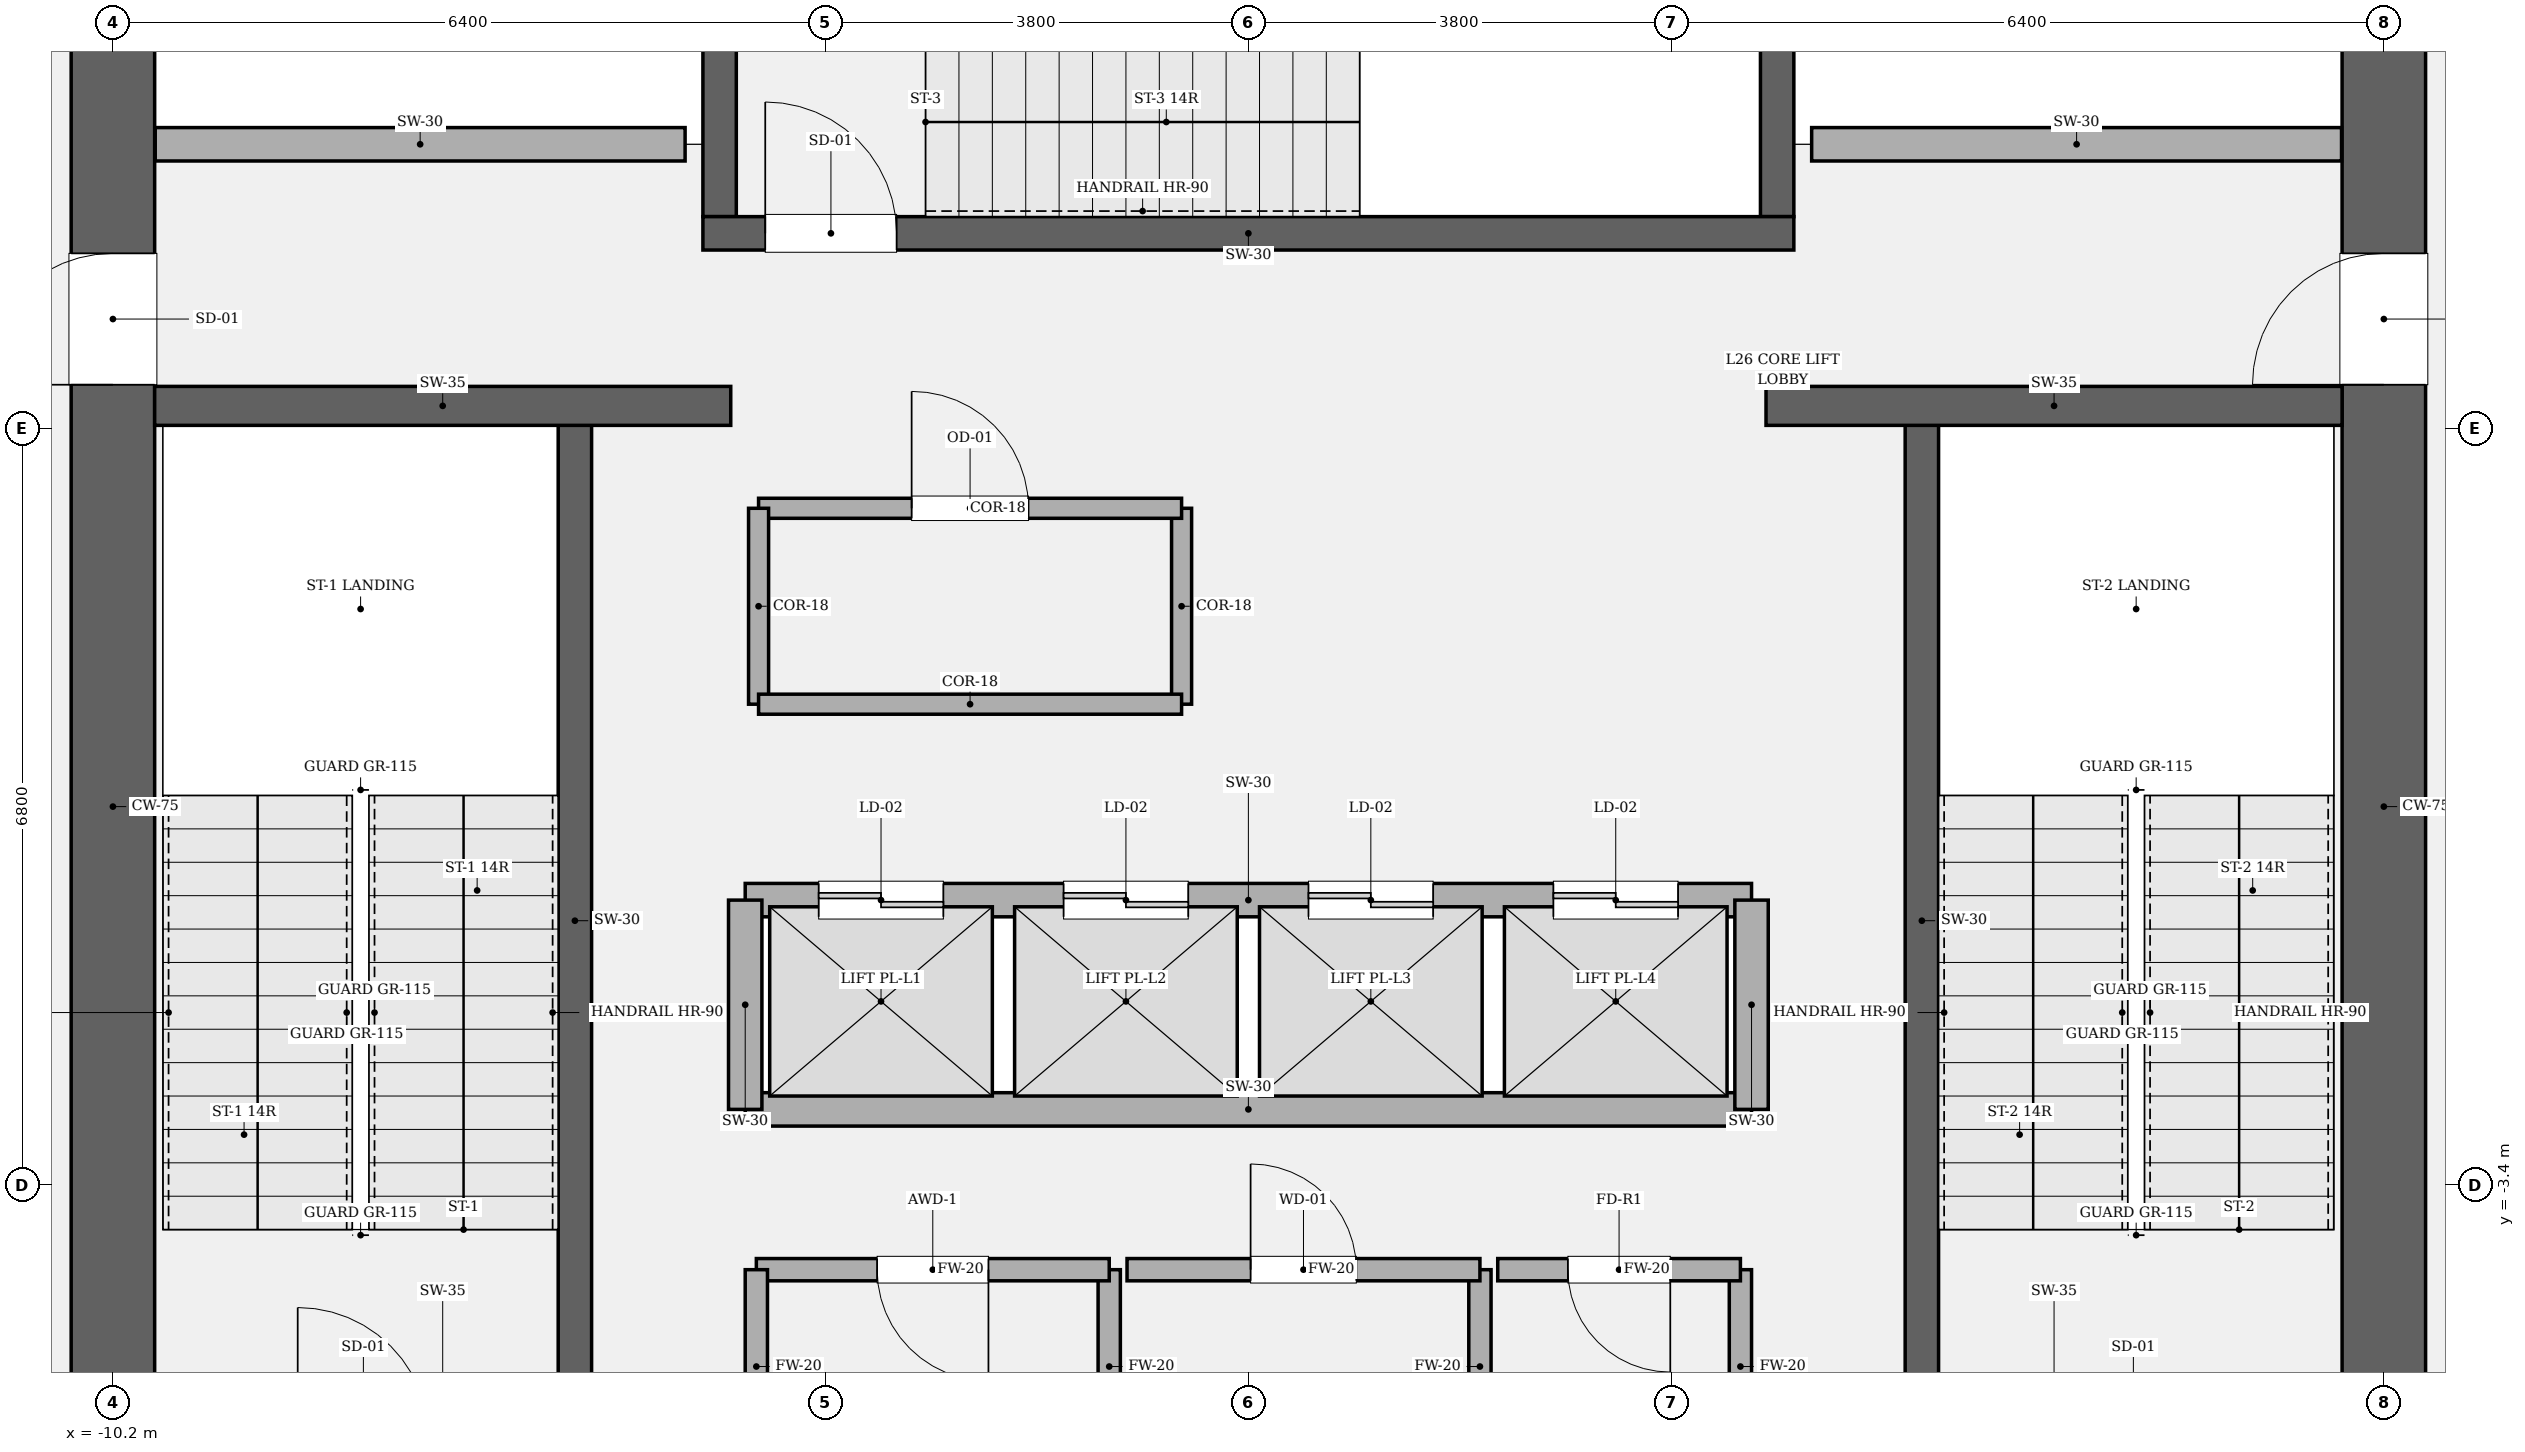
"""IFC4 building model, lengths in metres.
Left out: names, types, materials, properties, quantities, classifications, styles, units other than length and angle.
Written with IfcOpenShell. Run it as: python <this file> out.ifc"""

import sys

from ifc_helpers import new_model, si_unit, direction, frame, frame_2d, origin, place, context, subcontext, project, spatial, rectangle, extrude, element, fill, save


model = new_model("IFC4")
c1 = context("Model", 3, precision=1e-05, world=origin(), true_north=direction((0.0, 1.0)))
c2 = subcontext(c1, "Body", "Model", "MODEL_VIEW")
j1 = project(units=[si_unit("LENGTHUNIT", "METRE"), si_unit("PLANEANGLEUNIT", "RADIAN")], contexts=[c1])
p1 = place(None, origin())
s1 = spatial("IfcSite", under=j1, at=p1, CompositionType="ELEMENT")
p2 = place(p1, origin())
s2 = spatial("IfcBuilding", under=s1, at=p2, CompositionType="ELEMENT")
p3 = place(p2, frame((0.0, 0.0, 113.25)))
s3 = spatial("IfcBuildingStorey", under=s2, at=p3, CompositionType="ELEMENT", Elevation=113.25)
p4 = place(p3, frame((-10.2, -8.825, 0.0), z_axis=(0.0, 0.0, 1.0), x_axis=(0.0, 1.0, 0.0)))
e1 = element("IfcWall", 1, at=p4, inside=s3, PredefinedType="SHEAR", context=c2, shape_type="SweptSolid", body=[
    extrude(rectangle(XDim=17.65, YDim=0.75, at=frame_2d((8.825, 0.0))), origin(), (0.0, 0.0, 1.0), 4.05),
])
p5 = place(p4, frame((12.615, 0.0, 0.0)))
e2 = element("IfcOpeningElement", 2, at=p5, cuts=e1, PredefinedType="OPENING", context=c2, shape_type="SweptSolid", body=[
    extrude(rectangle(XDim=1.18, YDim=2.2, at=frame_2d((0.59, 1.1))), frame((0.0, 0.385, 0.0), z_axis=(0.0, -1.0, 0.0), x_axis=(1.0, 0.0, 0.0)), (0.0, 0.0, 1.0), 0.77),
])
p6 = place(p3, frame((10.2, 8.825, 0.0), z_axis=(0.0, 0.0, 1.0), x_axis=(0.0, -1.0, 0.0)))
e3 = element("IfcWall", 3, at=p6, inside=s3, PredefinedType="SHEAR", context=c2, shape_type="SweptSolid", body=[
    extrude(rectangle(XDim=17.65, YDim=0.75, at=frame_2d((8.825, 0.0))), origin(), (0.0, 0.0, 1.0), 4.05),
])
p7 = place(p6, frame((3.855, 0.0, 0.0)))
e4 = element("IfcOpeningElement", 4, at=p7, cuts=e3, PredefinedType="OPENING", context=c2, shape_type="SweptSolid", body=[
    extrude(rectangle(XDim=1.18, YDim=2.2, at=frame_2d((0.59, 1.1))), frame((0.0, 0.385, 0.0), z_axis=(0.0, -1.0, 0.0), x_axis=(1.0, 0.0, 0.0)), (0.0, 0.0, 1.0), 0.77),
])
for number, where, z_axis, x_axis in (
    (5, (-6.05, -5.5, 0.0), (0.0, 0.0, 1.0), (0.0, 1.0, 0.0)),
    (6, (6.05, 3.45, 0.0), (0.0, 0.0, 1.0), (0.0, -1.0, 0.0)),
):
    element("IfcWall", number, at=place(p3, frame(where, z_axis=z_axis, x_axis=x_axis)), inside=s3, PredefinedType="SOLIDWALL", context=c2, shape_type="SweptSolid", body=[
        extrude(rectangle(XDim=8.95, YDim=0.3, at=frame_2d((4.475, 0.0))), origin(), (0.0, 0.0, 1.0), 4.05),
    ])
for number, where, z_axis, x_axis in (
    (7, (-4.75, 5.3, 0.0), (0.0, 0.0, 1.0), (0.0, 1.0, 0.0)),
    (8, (4.75, 8.825, 0.0), (0.0, 0.0, 1.0), (0.0, -1.0, 0.0)),
):
    element("IfcWall", number, at=place(p3, frame(where, z_axis=z_axis, x_axis=x_axis)), inside=s3, PredefinedType="SOLIDWALL", context=c2, shape_type="SweptSolid", body=[
        extrude(rectangle(XDim=3.525, YDim=0.3, at=frame_2d((1.762, 0.0))), origin(), (0.0, 0.0, 1.0), 4.05),
    ])
p8 = place(p3, frame((-4.9, 5.15, 0.0), z_axis=(0.0, 0.0, 1.0), x_axis=(1.0, 0.0, 0.0)))
e9 = element("IfcWall", 9, at=p8, inside=s3, PredefinedType="SOLIDWALL", context=c2, shape_type="SweptSolid", body=[
    extrude(rectangle(XDim=9.8, YDim=0.3, at=frame_2d((4.9, 0.0))), origin(), (0.0, 0.0, 1.0), 4.05),
])
p9 = place(p8, frame((0.56, 0.0, 0.0)))
e10 = element("IfcOpeningElement", 10, at=p9, cuts=e9, PredefinedType="OPENING", context=c2, shape_type="SweptSolid", body=[
    extrude(rectangle(XDim=1.18, YDim=2.2, at=frame_2d((0.59, 1.1))), frame((0.0, 0.16, 0.0), z_axis=(0.0, -1.0, 0.0), x_axis=(1.0, 0.0, 0.0)), (0.0, 0.0, 1.0), 0.32),
])
for number, where, z_axis, x_axis in (
    (11, (-9.825, 3.6, 0.0), (0.0, 0.0, 1.0), (1.0, 0.0, 0.0)),
    (12, (4.65, 3.6, 0.0), (0.0, 0.0, 1.0), (1.0, 0.0, 0.0)),
):
    element("IfcWall", number, at=place(p3, frame(where, z_axis=z_axis, x_axis=x_axis)), inside=s3, PredefinedType="SOLIDWALL", context=c2, shape_type="SweptSolid", body=[
        extrude(rectangle(XDim=5.175, YDim=0.35, at=frame_2d((2.587, 0.0))), origin(), (0.0, 0.0, 1.0), 4.05),
    ])
p10 = place(p3, frame((-4.52, -0.84, 0.0), z_axis=(0.0, 0.0, 1.0), x_axis=(1.0, 0.0, 0.0)))
e13 = element("IfcWall", 13, at=p10, inside=s3, PredefinedType="SOLIDWALL", context=c2, shape_type="SweptSolid", body=[
    extrude(rectangle(XDim=9.04, YDim=0.3, at=frame_2d((4.52, 0.0))), origin(), (0.0, 0.0, 1.0), 3.81),
])
p11 = place(p10, frame((0.66, 0.0, 0.0)))
e14 = element("IfcOpeningElement", 14, at=p11, cuts=e13, PredefinedType="OPENING", context=c2, shape_type="SweptSolid", body=[
    extrude(rectangle(XDim=1.12, YDim=2.25, at=frame_2d((0.56, 1.125))), frame((0.0, 0.16, 0.0), z_axis=(0.0, -1.0, 0.0), x_axis=(1.0, 0.0, 0.0)), (0.0, 0.0, 1.0), 0.32),
])
p12 = place(p10, frame((2.86, 0.0, 0.0)))
e15 = element("IfcOpeningElement", 15, at=p12, cuts=e13, PredefinedType="OPENING", context=c2, shape_type="SweptSolid", body=[
    extrude(rectangle(XDim=1.12, YDim=2.25, at=frame_2d((0.56, 1.125))), frame((0.0, 0.16, 0.0), z_axis=(0.0, -1.0, 0.0), x_axis=(1.0, 0.0, 0.0)), (0.0, 0.0, 1.0), 0.32),
])
p13 = place(p10, frame((5.06, 0.0, 0.0)))
e16 = element("IfcOpeningElement", 16, at=p13, cuts=e13, PredefinedType="OPENING", context=c2, shape_type="SweptSolid", body=[
    extrude(rectangle(XDim=1.12, YDim=2.25, at=frame_2d((0.56, 1.125))), frame((0.0, 0.16, 0.0), z_axis=(0.0, -1.0, 0.0), x_axis=(1.0, 0.0, 0.0)), (0.0, 0.0, 1.0), 0.32),
])
p14 = place(p10, frame((7.26, 0.0, 0.0)))
e17 = element("IfcOpeningElement", 17, at=p14, cuts=e13, PredefinedType="OPENING", context=c2, shape_type="SweptSolid", body=[
    extrude(rectangle(XDim=1.12, YDim=2.25, at=frame_2d((0.56, 1.125))), frame((0.0, 0.16, 0.0), z_axis=(0.0, -1.0, 0.0), x_axis=(1.0, 0.0, 0.0)), (0.0, 0.0, 1.0), 0.32),
])
p15 = place(p3, frame((-4.52, -2.72, 0.0), z_axis=(0.0, 0.0, 1.0), x_axis=(1.0, 0.0, 0.0)))
e18 = element("IfcWall", 18, at=p15, inside=s3, PredefinedType="SOLIDWALL", context=c2, shape_type="SweptSolid", body=[
    extrude(rectangle(XDim=9.04, YDim=0.3, at=frame_2d((4.52, 0.0))), origin(), (0.0, 0.0, 1.0), 3.81),
])
for number, where, z_axis, x_axis in (
    (19, (-4.52, -2.72, 0.0), (0.0, 0.0, 1.0), (0.0, 1.0, 0.0)),
    (20, (4.52, -2.72, 0.0), (0.0, 0.0, 1.0), (0.0, 1.0, 0.0)),
):
    element("IfcWall", number, at=place(p3, frame(where, z_axis=z_axis, x_axis=x_axis)), inside=s3, PredefinedType="SOLIDWALL", context=c2, shape_type="SweptSolid", body=[
        extrude(rectangle(XDim=1.88, YDim=0.3, at=frame_2d((0.94, 0.0))), origin(), (0.0, 0.0, 1.0), 3.81),
    ])
for number, where, z_axis, x_axis in (
    (21, (-9.82, 5.95, 0.0), (0.0, 0.0, 1.0), (1.0, 0.0, 0.0)),
    (22, (5.06, 5.95, 0.0), (0.0, 0.0, 1.0), (1.0, 0.0, 0.0)),
):
    element("IfcWall", number, at=place(p3, frame(where, z_axis=z_axis, x_axis=x_axis)), inside=s3, PredefinedType="SOLIDWALL", context=c2, shape_type="SweptSolid", body=[
        extrude(rectangle(XDim=4.76, YDim=0.3, at=frame_2d((2.38, 0.0))), origin(), (0.0, 0.0, 1.0), 3.81),
    ])
p16 = place(p3, frame((-1.25, -5.9, 0.0), z_axis=(0.0, 0.0, 1.0), x_axis=(0.0, 1.0, 0.0)))
e23 = element("IfcWall", 23, at=p16, inside=s3, PredefinedType="SOLIDWALL", context=c2, shape_type="SweptSolid", body=[
    extrude(rectangle(XDim=1.74, YDim=0.2, at=frame_2d((0.87, 0.0))), origin(), (0.0, 0.0, 1.0), 3.81),
])
p17 = place(p3, frame((-1.25, -4.16, 0.0), z_axis=(0.0, 0.0, 1.0), x_axis=(-1.0, 0.0, 0.0)))
e24 = element("IfcWall", 24, at=p17, inside=s3, PredefinedType="SOLIDWALL", context=c2, shape_type="SweptSolid", body=[
    extrude(rectangle(XDim=3.17, YDim=0.2, at=frame_2d((1.585, 0.0))), origin(), (0.0, 0.0, 1.0), 3.81),
])
p18 = place(p17, frame((1.085, 0.0, 0.0)))
e25 = element("IfcOpeningElement", 25, at=p18, cuts=e24, PredefinedType="OPENING", context=c2, shape_type="SweptSolid", body=[
    extrude(rectangle(XDim=1.0, YDim=2.15, at=frame_2d((0.5, 1.075))), frame((0.0, 0.11, 0.0), z_axis=(0.0, -1.0, 0.0), x_axis=(1.0, 0.0, 0.0)), (0.0, 0.0, 1.0), 0.22),
])
for number, where, z_axis, x_axis in (
    (26, (-4.42, -4.16, 0.0), (0.0, 0.0, 1.0), (0.0, -1.0, 0.0)),
    (27, (2.08, -5.9, 0.0), (0.0, 0.0, 1.0), (0.0, 1.0, 0.0)),
):
    element("IfcWall", number, at=place(p3, frame(where, z_axis=z_axis, x_axis=x_axis)), inside=s3, PredefinedType="SOLIDWALL", context=c2, shape_type="SweptSolid", body=[
        extrude(rectangle(XDim=1.74, YDim=0.2, at=frame_2d((0.87, 0.0))), origin(), (0.0, 0.0, 1.0), 3.81),
    ])
p19 = place(p3, frame((2.08, -4.16, 0.0), z_axis=(0.0, 0.0, 1.0), x_axis=(-1.0, 0.0, 0.0)))
e28 = element("IfcWall", 28, at=p19, inside=s3, PredefinedType="SOLIDWALL", context=c2, shape_type="SweptSolid", body=[
    extrude(rectangle(XDim=3.17, YDim=0.2, at=frame_2d((1.585, 0.0))), origin(), (0.0, 0.0, 1.0), 3.81),
])
p20 = place(p19, frame((1.11, 0.0, 0.0)))
e29 = element("IfcOpeningElement", 29, at=p20, cuts=e28, PredefinedType="OPENING", context=c2, shape_type="SweptSolid", body=[
    extrude(rectangle(XDim=0.95, YDim=2.15, at=frame_2d((0.475, 1.075))), frame((0.0, 0.11, 0.0), z_axis=(0.0, -1.0, 0.0), x_axis=(1.0, 0.0, 0.0)), (0.0, 0.0, 1.0), 0.22),
])
p21 = place(p3, frame((4.42, -5.9, 0.0), z_axis=(0.0, 0.0, 1.0), x_axis=(0.0, 1.0, 0.0)))
e30 = element("IfcWall", 30, at=p21, inside=s3, PredefinedType="SOLIDWALL", context=c2, shape_type="SweptSolid", body=[
    extrude(rectangle(XDim=1.74, YDim=0.2, at=frame_2d((0.87, 0.0))), origin(), (0.0, 0.0, 1.0), 3.81),
])
p22 = place(p3, frame((4.42, -4.16, 0.0), z_axis=(0.0, 0.0, 1.0), x_axis=(-1.0, 0.0, 0.0)))
e31 = element("IfcWall", 31, at=p22, inside=s3, PredefinedType="SOLIDWALL", context=c2, shape_type="SweptSolid", body=[
    extrude(rectangle(XDim=2.18, YDim=0.2, at=frame_2d((1.09, 0.0))), origin(), (0.0, 0.0, 1.0), 3.81),
])
p23 = place(p22, frame((0.63, 0.0, 0.0)))
e32 = element("IfcOpeningElement", 32, at=p23, cuts=e31, PredefinedType="OPENING", context=c2, shape_type="SweptSolid", body=[
    extrude(rectangle(XDim=0.92, YDim=2.1, at=frame_2d((0.46, 1.05))), frame((0.0, 0.11, 0.0), z_axis=(0.0, -1.0, 0.0), x_axis=(1.0, 0.0, 0.0)), (0.0, 0.0, 1.0), 0.22),
])
p24 = place(p3, frame((-0.6, 0.92, 0.0), z_axis=(0.0, 0.0, 1.0), x_axis=(0.0, 1.0, 0.0)))
e33 = element("IfcWall", 33, at=p24, inside=s3, PredefinedType="PARTITIONING", context=c2, shape_type="SweptSolid", body=[
    extrude(rectangle(XDim=1.76, YDim=0.18, at=frame_2d((0.88, 0.0))), origin(), (0.0, 0.0, 1.0), 3.81),
])
p25 = place(p3, frame((-0.6, 2.68, 0.0), z_axis=(0.0, 0.0, 1.0), x_axis=(-1.0, 0.0, 0.0)))
e34 = element("IfcWall", 34, at=p25, inside=s3, PredefinedType="PARTITIONING", context=c2, shape_type="SweptSolid", body=[
    extrude(rectangle(XDim=3.8, YDim=0.18, at=frame_2d((1.9, 0.0))), origin(), (0.0, 0.0, 1.0), 3.81),
])
p26 = place(p25, frame((1.375, 0.0, 0.0)))
e35 = element("IfcOpeningElement", 35, at=p26, cuts=e34, PredefinedType="OPENING", context=c2, shape_type="SweptSolid", body=[
    extrude(rectangle(XDim=1.05, YDim=2.2, at=frame_2d((0.525, 1.1))), frame((0.0, 0.1, 0.0), z_axis=(0.0, -1.0, 0.0), x_axis=(1.0, 0.0, 0.0)), (0.0, 0.0, 1.0), 0.2),
])
p27 = place(p3, frame((-4.4, 2.68, 0.0), z_axis=(0.0, 0.0, 1.0), x_axis=(0.0, -1.0, 0.0)))
e36 = element("IfcWall", 36, at=p27, inside=s3, PredefinedType="PARTITIONING", context=c2, shape_type="SweptSolid", body=[
    extrude(rectangle(XDim=1.76, YDim=0.18, at=frame_2d((0.88, 0.0))), origin(), (0.0, 0.0, 1.0), 3.81),
])
p28 = place(p3, frame((-4.4, 0.92, 0.0), z_axis=(0.0, 0.0, 1.0), x_axis=(1.0, 0.0, 0.0)))
e37 = element("IfcWall", 37, at=p28, inside=s3, PredefinedType="PARTITIONING", context=c2, shape_type="SweptSolid", body=[
    extrude(rectangle(XDim=3.8, YDim=0.18, at=frame_2d((1.9, 0.0))), origin(), (0.0, 0.0, 1.0), 3.81),
])
p29 = place(p9, origin())
e38 = element("IfcDoor", 38, at=p29, inside=s3, OperationType="SINGLE_SWING_LEFT", PredefinedType="DOOR", context=c2, shape_type="SweptSolid", body=[
    extrude(rectangle(XDim=1.18, YDim=2.2, at=frame_2d((0.59, 1.1))), frame((0.0, 0.025, 0.0), z_axis=(0.0, -1.0, 0.0), x_axis=(1.0, 0.0, 0.0)), (0.0, 0.0, 1.0), 0.05),
])
fill(e10, e38)
p30 = place(p5, origin())
e39 = element("IfcDoor", 39, at=p30, inside=s3, OperationType="SINGLE_SWING_LEFT", PredefinedType="DOOR", context=c2, shape_type="SweptSolid", body=[
    extrude(rectangle(XDim=1.18, YDim=2.2, at=frame_2d((0.59, 1.1))), frame((0.0, 0.025, 0.0), z_axis=(0.0, -1.0, 0.0), x_axis=(1.0, 0.0, 0.0)), (0.0, 0.0, 1.0), 0.05),
])
fill(e2, e39)
p31 = place(p7, origin())
e40 = element("IfcDoor", 40, at=p31, inside=s3, OperationType="SINGLE_SWING_RIGHT", PredefinedType="DOOR", context=c2, shape_type="SweptSolid", body=[
    extrude(rectangle(XDim=1.18, YDim=2.2, at=frame_2d((0.59, 1.1))), frame((0.0, 0.025, 0.0), z_axis=(0.0, -1.0, 0.0), x_axis=(1.0, 0.0, 0.0)), (0.0, 0.0, 1.0), 0.05),
])
fill(e4, e40)
p32 = place(p11, origin())
e41 = element("IfcDoor", 41, at=p32, inside=s3, OperationType="DOUBLE_DOOR_SLIDING", PredefinedType="DOOR", context=c2, shape_type="SweptSolid", body=[
    extrude(rectangle(XDim=1.12, YDim=2.25, at=frame_2d((0.56, 1.125))), frame((0.0, 0.025, 0.0), z_axis=(0.0, -1.0, 0.0), x_axis=(1.0, 0.0, 0.0)), (0.0, 0.0, 1.0), 0.05),
])
fill(e14, e41)
p33 = place(p12, origin())
e42 = element("IfcDoor", 42, at=p33, inside=s3, OperationType="DOUBLE_DOOR_SLIDING", PredefinedType="DOOR", context=c2, shape_type="SweptSolid", body=[
    extrude(rectangle(XDim=1.12, YDim=2.25, at=frame_2d((0.56, 1.125))), frame((0.0, 0.025, 0.0), z_axis=(0.0, -1.0, 0.0), x_axis=(1.0, 0.0, 0.0)), (0.0, 0.0, 1.0), 0.05),
])
fill(e15, e42)
p34 = place(p13, origin())
e43 = element("IfcDoor", 43, at=p34, inside=s3, OperationType="DOUBLE_DOOR_SLIDING", PredefinedType="DOOR", context=c2, shape_type="SweptSolid", body=[
    extrude(rectangle(XDim=1.12, YDim=2.25, at=frame_2d((0.56, 1.125))), frame((0.0, 0.025, 0.0), z_axis=(0.0, -1.0, 0.0), x_axis=(1.0, 0.0, 0.0)), (0.0, 0.0, 1.0), 0.05),
])
fill(e16, e43)
p35 = place(p14, origin())
e44 = element("IfcDoor", 44, at=p35, inside=s3, OperationType="DOUBLE_DOOR_SLIDING", PredefinedType="DOOR", context=c2, shape_type="SweptSolid", body=[
    extrude(rectangle(XDim=1.12, YDim=2.25, at=frame_2d((0.56, 1.125))), frame((0.0, 0.025, 0.0), z_axis=(0.0, -1.0, 0.0), x_axis=(1.0, 0.0, 0.0)), (0.0, 0.0, 1.0), 0.05),
])
fill(e17, e44)
p36 = place(p18, origin())
e45 = element("IfcDoor", 45, at=p36, inside=s3, OperationType="SINGLE_SWING_LEFT", PredefinedType="DOOR", context=c2, shape_type="SweptSolid", body=[
    extrude(rectangle(XDim=1.0, YDim=2.15, at=frame_2d((0.5, 1.075))), frame((0.0, 0.025, 0.0), z_axis=(0.0, -1.0, 0.0), x_axis=(1.0, 0.0, 0.0)), (0.0, 0.0, 1.0), 0.05),
])
fill(e25, e45)
p37 = place(p20, origin())
e46 = element("IfcDoor", 46, at=p37, inside=s3, OperationType="SINGLE_SWING_RIGHT", PredefinedType="DOOR", context=c2, shape_type="SweptSolid", body=[
    extrude(rectangle(XDim=0.95, YDim=2.15, at=frame_2d((0.475, 1.075))), frame((0.0, 0.025, 0.0), z_axis=(0.0, -1.0, 0.0), x_axis=(1.0, 0.0, 0.0)), (0.0, 0.0, 1.0), 0.05),
])
fill(e29, e46)
p38 = place(p23, origin())
e47 = element("IfcDoor", 47, at=p38, inside=s3, OperationType="SINGLE_SWING_LEFT", PredefinedType="DOOR", context=c2, shape_type="SweptSolid", body=[
    extrude(rectangle(XDim=0.92, YDim=2.1, at=frame_2d((0.46, 1.05))), frame((0.0, 0.025, 0.0), z_axis=(0.0, -1.0, 0.0), x_axis=(1.0, 0.0, 0.0)), (0.0, 0.0, 1.0), 0.05),
])
fill(e32, e47)
p39 = place(p26, origin())
e48 = element("IfcDoor", 48, at=p39, inside=s3, OperationType="SINGLE_SWING_RIGHT", PredefinedType="DOOR", context=c2, shape_type="SweptSolid", body=[
    extrude(rectangle(XDim=1.05, YDim=2.2, at=frame_2d((0.525, 1.1))), frame((0.0, 0.025, 0.0), z_axis=(0.0, -1.0, 0.0), x_axis=(1.0, 0.0, 0.0)), (0.0, 0.0, 1.0), 0.05),
])
fill(e35, e48)
save(model, sys.argv[1])
